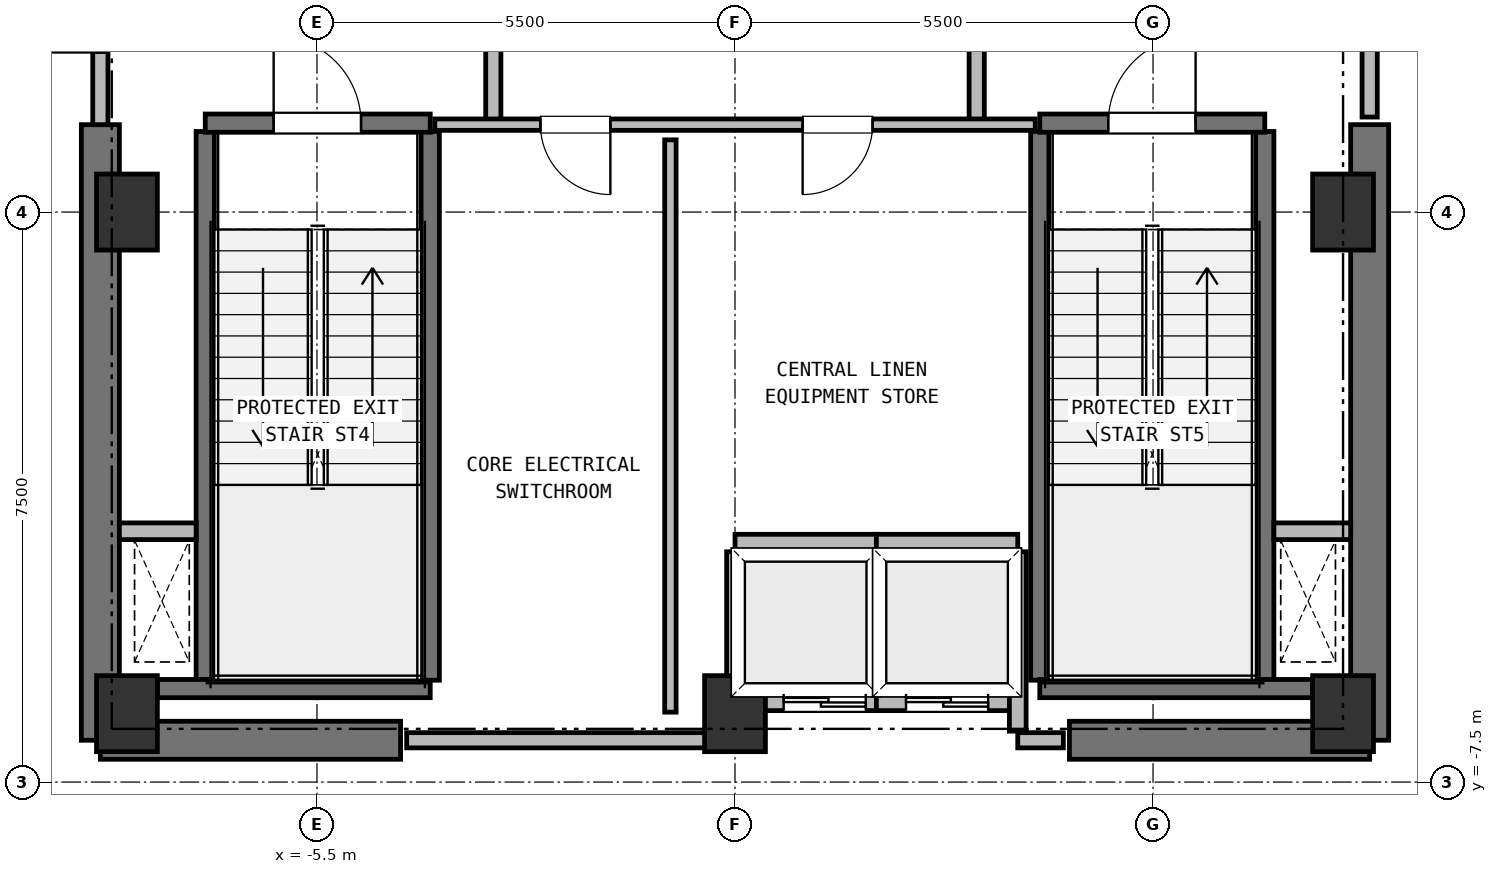
"""IFC4 building model, lengths in metres.
Left out: names, types, materials, properties, quantities, classifications, styles, units other than length and angle.
Written with IfcOpenShell. Run it as: python <this file> out.ifc"""

import sys

from ifc_helpers import new_model, si_unit, direction, frame, frame_2d, origin, origin_2d, place, context, subcontext, project, spatial, rectangle, extrude, element, fill, save


model = new_model("IFC4")
c1 = context("Model", 3, precision=1e-05, world=origin(), true_north=direction((0.0, 1.0)))
c2 = subcontext(c1, "Body", "Model", "MODEL_VIEW")
j1 = project(units=[si_unit("LENGTHUNIT", "METRE"), si_unit("PLANEANGLEUNIT", "RADIAN")], contexts=[c1])
p1 = place(None, origin())
s1 = spatial("IfcSite", under=j1, at=p1, CompositionType="ELEMENT")
p2 = place(p1, origin())
s2 = spatial("IfcBuilding", under=s1, at=p2, CompositionType="ELEMENT")
p3 = place(p2, frame((0.0, 0.0, 173.75)))
s3 = spatial("IfcBuildingStorey", under=s2, at=p3, CompositionType="ELEMENT", Elevation=173.75)
for number, where, z_axis, x_axis in (
    (1, (-8.0, -6.6, 0.0), (0.0, 0.0, 1.0), (1.0, 0.0, 0.0)),
    (2, (0.0, -6.6, 0.0), (0.0, 0.0, 1.0), (1.0, 0.0, 0.0)),
    (3, (8.0, -6.6, 0.0), (0.0, 0.0, 1.0), (1.0, 0.0, 0.0)),
    (4, (8.0, 0.0, 0.0), (0.0, 0.0, 1.0), (1.0, 0.0, 0.0)),
    (5, (-8.0, 0.0, 0.0), (0.0, 0.0, 1.0), (1.0, 0.0, 0.0)),
):
    element("IfcColumn", number, at=place(p3, frame(where, z_axis=z_axis, x_axis=x_axis)), inside=s3, PredefinedType="COLUMN", context=c2, shape_type="SweptSolid", body=[
        extrude(rectangle(XDim=0.8, YDim=1.0, at=origin_2d()), origin(), (0.0, 0.0, 1.0), 4.5),
    ])
for number, where, z_axis, x_axis in (
    (6, (-8.35, -6.95, 0.0), (0.0, 0.0, 1.0), (1.0, 0.0, 0.0)),
    (7, (4.4, -6.95, 0.0), (0.0, 0.0, 1.0), (1.0, 0.0, 0.0)),
):
    element("IfcWall", number, at=place(p3, frame(where, z_axis=z_axis, x_axis=x_axis)), inside=s3, PredefinedType="SHEAR", context=c2, shape_type="SweptSolid", body=[
        extrude(rectangle(XDim=3.95, YDim=0.5, at=frame_2d((1.975, 0.0))), origin(), (0.0, 0.0, 1.0), 4.21),
    ])
for number, where, z_axis, x_axis in (
    (8, (-8.35, -6.95, 0.0), (0.0, 0.0, 1.0), (0.0, 1.0, 0.0)),
    (9, (8.35, -6.95, 0.0), (0.0, 0.0, 1.0), (0.0, 1.0, 0.0)),
):
    element("IfcWall", number, at=place(p3, frame(where, z_axis=z_axis, x_axis=x_axis)), inside=s3, PredefinedType="SHEAR", context=c2, shape_type="SweptSolid", body=[
        extrude(rectangle(XDim=8.1, YDim=0.5, at=frame_2d((4.05, 0.0))), origin(), (0.0, 0.0, 1.0), 4.21),
    ])
p4 = place(p3, frame((13.125, -5.494, 0.0), z_axis=(0.0, 0.0, 1.0), x_axis=(-0.669139779012, -0.743136566281, 0.0)))
e10 = element("IfcWall", 10, at=p4, inside=s3, PredefinedType="SOLIDWALL", context=c2, shape_type="SweptSolid", body=[
    extrude(rectangle(XDim=9.4, YDim=0.36, at=frame_2d((4.7, 0.0))), origin(), (0.0, 0.0, 1.0), 3.89),
])
p5 = place(p4, frame((3.875, 0.0, 0.0)))
e11 = element("IfcOpeningElement", 11, at=p5, cuts=e10, PredefinedType="OPENING", context=c2, shape_type="SweptSolid", body=[
    extrude(rectangle(XDim=1.65, YDim=2.25, at=frame_2d((0.825, 1.125))), frame((0.0, 0.19, 0.0), z_axis=(0.0, -1.0, 0.0), x_axis=(1.0, 0.0, 0.0)), (0.0, 0.0, 1.0), 0.38),
])
p6 = place(p3, frame((-6.97, -6.16, 0.0), z_axis=(0.0, 0.0, 1.0), x_axis=(0.0, 1.0, 0.0)))
e12 = element("IfcWall", 12, at=p6, inside=s3, PredefinedType="SHEAR", context=c2, shape_type="SweptSolid", body=[
    extrude(rectangle(XDim=7.22, YDim=0.24, at=frame_2d((3.61, 0.0))), origin(), (0.0, 0.0, 1.0), 4.21),
])
p7 = place(p3, frame((-7.6, -6.27, 0.0), z_axis=(0.0, 0.0, 1.0), x_axis=(1.0, 0.0, 0.0)))
e13 = element("IfcWall", 13, at=p7, inside=s3, PredefinedType="SHEAR", context=c2, shape_type="SweptSolid", body=[
    extrude(rectangle(XDim=3.59, YDim=0.24, at=frame_2d((1.795, 0.0))), origin(), (0.0, 0.0, 1.0), 4.21),
])
p8 = place(p3, frame((-4.01, -6.16, 0.0), z_axis=(0.0, 0.0, 1.0), x_axis=(0.0, 1.0, 0.0)))
e14 = element("IfcWall", 14, at=p8, inside=s3, PredefinedType="SHEAR", context=c2, shape_type="SweptSolid", body=[
    extrude(rectangle(XDim=7.22, YDim=0.24, at=frame_2d((3.61, 0.0))), origin(), (0.0, 0.0, 1.0), 4.21),
])
p9 = place(p3, frame((-6.97, 1.17, 0.0), z_axis=(0.0, 0.0, 1.0), x_axis=(1.0, 0.0, 0.0)))
e15 = element("IfcWall", 15, at=p9, inside=s3, PredefinedType="SHEAR", context=c2, shape_type="SweptSolid", body=[
    extrude(rectangle(XDim=2.96, YDim=0.24, at=frame_2d((1.48, 0.0))), origin(), (0.0, 0.0, 1.0), 4.21),
])
p10 = place(p9, frame((0.9, 0.0, 0.0)))
e16 = element("IfcOpeningElement", 16, at=p10, cuts=e15, PredefinedType="OPENING", context=c2, shape_type="SweptSolid", body=[
    extrude(rectangle(XDim=1.15, YDim=2.15, at=frame_2d((0.575, 1.075))), frame((0.0, 0.13, 0.0), z_axis=(0.0, -1.0, 0.0), x_axis=(1.0, 0.0, 0.0)), (0.0, 0.0, 1.0), 0.26),
])
for number, where, z_axis, x_axis in (
    (17, (4.01, -6.16, 0.0), (0.0, 0.0, 1.0), (0.0, 1.0, 0.0)),
    (18, (6.97, -6.16, 0.0), (0.0, 0.0, 1.0), (0.0, 1.0, 0.0)),
):
    element("IfcWall", number, at=place(p3, frame(where, z_axis=z_axis, x_axis=x_axis)), inside=s3, PredefinedType="SHEAR", context=c2, shape_type="SweptSolid", body=[
        extrude(rectangle(XDim=7.22, YDim=0.24, at=frame_2d((3.61, 0.0))), origin(), (0.0, 0.0, 1.0), 4.21),
    ])
p11 = place(p3, frame((4.01, -6.27, 0.0), z_axis=(0.0, 0.0, 1.0), x_axis=(1.0, 0.0, 0.0)))
e19 = element("IfcWall", 19, at=p11, inside=s3, PredefinedType="SHEAR", context=c2, shape_type="SweptSolid", body=[
    extrude(rectangle(XDim=3.59, YDim=0.24, at=frame_2d((1.795, 0.0))), origin(), (0.0, 0.0, 1.0), 4.21),
])
p12 = place(p3, frame((4.01, 1.17, 0.0), z_axis=(0.0, 0.0, 1.0), x_axis=(1.0, 0.0, 0.0)))
e20 = element("IfcWall", 20, at=p12, inside=s3, PredefinedType="SHEAR", context=c2, shape_type="SweptSolid", body=[
    extrude(rectangle(XDim=2.96, YDim=0.24, at=frame_2d((1.48, 0.0))), origin(), (0.0, 0.0, 1.0), 4.21),
])
p13 = place(p12, frame((0.9, 0.0, 0.0)))
e21 = element("IfcOpeningElement", 21, at=p13, cuts=e20, PredefinedType="OPENING", context=c2, shape_type="SweptSolid", body=[
    extrude(rectangle(XDim=1.15, YDim=2.15, at=frame_2d((0.575, 1.075))), frame((0.0, 0.13, 0.0), z_axis=(0.0, -1.0, 0.0), x_axis=(1.0, 0.0, 0.0)), (0.0, 0.0, 1.0), 0.26),
])
for number, where, z_axis, x_axis in (
    (22, (-8.1, -4.2, 0.0), (0.0, 0.0, 1.0), (1.0, 0.0, 0.0)),
    (23, (7.09, -4.2, 0.0), (0.0, 0.0, 1.0), (1.0, 0.0, 0.0)),
):
    element("IfcWall", number, at=place(p3, frame(where, z_axis=z_axis, x_axis=x_axis)), inside=s3, PredefinedType="PARTITIONING", context=c2, shape_type="SweptSolid", body=[
        extrude(rectangle(XDim=1.01, YDim=0.22, at=frame_2d((0.505, 0.0))), origin(), (0.0, 0.0, 1.0), 4.21),
    ])
p14 = place(p3, frame((0.0, -6.45, 0.0), z_axis=(0.0, 0.0, 1.0), x_axis=(1.0, 0.0, 0.0)))
e24 = element("IfcWall", 24, at=p14, inside=s3, PredefinedType="PARTITIONING", context=c2, shape_type="SweptSolid", body=[
    extrude(rectangle(XDim=1.86, YDim=0.22, at=frame_2d((0.93, 0.0))), origin(), (0.0, 0.0, 1.0), 3.84),
])
p15 = place(p14, frame((0.64, 0.0, 0.0)))
e25 = element("IfcOpeningElement", 25, at=p15, cuts=e24, PredefinedType="OPENING", context=c2, shape_type="SweptSolid", body=[
    extrude(rectangle(XDim=1.08, YDim=2.15, at=frame_2d((0.54, 1.075))), frame((0.0, 0.12, 0.0), z_axis=(0.0, -1.0, 0.0), x_axis=(1.0, 0.0, 0.0)), (0.0, 0.0, 1.0), 0.24),
])
for number, where, z_axis, x_axis in (
    (26, (0.0, -4.35, 0.0), (0.0, 0.0, 1.0), (1.0, 0.0, 0.0)),
    (27, (0.0, -6.33, 0.0), (0.0, 0.0, 1.0), (0.0, 1.0, 0.0)),
    (28, (1.86, -6.33, 0.0), (0.0, 0.0, 1.0), (0.0, 1.0, 0.0)),
):
    element("IfcWall", number, at=place(p3, frame(where, z_axis=z_axis, x_axis=x_axis)), inside=s3, PredefinedType="PARTITIONING", context=c2, shape_type="SweptSolid", body=[
        extrude(rectangle(XDim=1.86, YDim=0.22, at=frame_2d((0.93, 0.0))), origin(), (0.0, 0.0, 1.0), 4.21),
    ])
p16 = place(p3, frame((1.86, -6.45, 0.0), z_axis=(0.0, 0.0, 1.0), x_axis=(1.0, 0.0, 0.0)))
e29 = element("IfcWall", 29, at=p16, inside=s3, PredefinedType="PARTITIONING", context=c2, shape_type="SweptSolid", body=[
    extrude(rectangle(XDim=1.86, YDim=0.22, at=frame_2d((0.93, 0.0))), origin(), (0.0, 0.0, 1.0), 3.84),
])
p17 = place(p16, frame((0.39, 0.0, 0.0)))
e30 = element("IfcOpeningElement", 30, at=p17, cuts=e29, PredefinedType="OPENING", context=c2, shape_type="SweptSolid", body=[
    extrude(rectangle(XDim=1.08, YDim=2.15, at=frame_2d((0.54, 1.075))), frame((0.0, 0.12, 0.0), z_axis=(0.0, -1.0, 0.0), x_axis=(1.0, 0.0, 0.0)), (0.0, 0.0, 1.0), 0.24),
])
p18 = place(p3, frame((1.86, -4.35, 0.0), z_axis=(0.0, 0.0, 1.0), x_axis=(1.0, 0.0, 0.0)))
e31 = element("IfcWall", 31, at=p18, inside=s3, PredefinedType="PARTITIONING", context=c2, shape_type="SweptSolid", body=[
    extrude(rectangle(XDim=1.86, YDim=0.22, at=frame_2d((0.93, 0.0))), origin(), (0.0, 0.0, 1.0), 4.21),
])
p19 = place(p3, frame((3.72, -6.83, 0.0), z_axis=(0.0, 0.0, 1.0), x_axis=(0.0, 1.0, 0.0)))
e32 = element("IfcWall", 32, at=p19, inside=s3, PredefinedType="PARTITIONING", context=c2, shape_type="SweptSolid", body=[
    extrude(rectangle(XDim=2.36, YDim=0.22, at=frame_2d((1.18, 0.0))), origin(), (0.0, 0.0, 1.0), 4.21),
])
p20 = place(p3, frame((-3.18, 1.15, 0.0), z_axis=(0.0, 0.0, 1.0), x_axis=(0.0, 1.0, 0.0)))
e33 = element("IfcWall", 33, at=p20, inside=s3, PredefinedType="PARTITIONING", context=c2, shape_type="SweptSolid", body=[
    extrude(rectangle(XDim=3.3, YDim=0.2, at=frame_2d((1.65, 0.0))), origin(), (0.0, 0.0, 1.0), 4.21),
])
p21 = place(p20, frame((1.08, 0.0, 0.0)))
e34 = element("IfcOpeningElement", 34, at=p21, cuts=e33, PredefinedType="OPENING", context=c2, shape_type="SweptSolid", body=[
    extrude(rectangle(XDim=1.15, YDim=2.15, at=frame_2d((0.575, 1.075))), frame((0.0, 0.11, 0.0), z_axis=(0.0, -1.0, 0.0), x_axis=(1.0, 0.0, 0.0)), (0.0, 0.0, 1.0), 0.22),
])
p22 = place(p3, frame((3.18, 1.15, 0.0), z_axis=(0.0, 0.0, 1.0), x_axis=(0.0, 1.0, 0.0)))
e35 = element("IfcWall", 35, at=p22, inside=s3, PredefinedType="PARTITIONING", context=c2, shape_type="SweptSolid", body=[
    extrude(rectangle(XDim=3.3, YDim=0.2, at=frame_2d((1.65, 0.0))), origin(), (0.0, 0.0, 1.0), 4.21),
])
p23 = place(p22, frame((1.08, 0.0, 0.0)))
e36 = element("IfcOpeningElement", 36, at=p23, cuts=e35, PredefinedType="OPENING", context=c2, shape_type="SweptSolid", body=[
    extrude(rectangle(XDim=1.15, YDim=2.15, at=frame_2d((0.575, 1.075))), frame((0.0, 0.11, 0.0), z_axis=(0.0, -1.0, 0.0), x_axis=(1.0, 0.0, 0.0)), (0.0, 0.0, 1.0), 0.22),
])
p24 = place(p3, frame((-8.35, 1.15, 0.0), z_axis=(0.0, 0.0, 1.0), x_axis=(0.0, 1.0, 0.0)))
e37 = element("IfcWall", 37, at=p24, inside=s3, PredefinedType="PARTITIONING", context=c2, shape_type="SweptSolid", body=[
    extrude(rectangle(XDim=5.4, YDim=0.2, at=frame_2d((2.7, 0.0))), origin(), (0.0, 0.0, 1.0), 4.21),
])
p25 = place(p24, frame((0.95, 0.0, 0.0)))
e38 = element("IfcOpeningElement", 38, at=p25, cuts=e37, PredefinedType="OPENING", context=c2, shape_type="SweptSolid", body=[
    extrude(rectangle(XDim=1.15, YDim=2.15, at=frame_2d((0.575, 1.075))), frame((0.0, 0.11, 0.0), z_axis=(0.0, -1.0, 0.0), x_axis=(1.0, 0.0, 0.0)), (0.0, 0.0, 1.0), 0.22),
])
p26 = place(p3, frame((8.35, 1.25, 0.0), z_axis=(0.0, 0.0, 1.0), x_axis=(0.0, 1.0, 0.0)))
e39 = element("IfcWall", 39, at=p26, inside=s3, PredefinedType="PARTITIONING", context=c2, shape_type="SweptSolid", body=[
    extrude(rectangle(XDim=5.3, YDim=0.2, at=frame_2d((2.65, 0.0))), origin(), (0.0, 0.0, 1.0), 4.21),
])
p27 = place(p26, frame((0.95, 0.0, 0.0)))
e40 = element("IfcOpeningElement", 40, at=p27, cuts=e39, PredefinedType="OPENING", context=c2, shape_type="SweptSolid", body=[
    extrude(rectangle(XDim=1.15, YDim=2.15, at=frame_2d((0.575, 1.075))), frame((0.0, 0.11, 0.0), z_axis=(0.0, -1.0, 0.0), x_axis=(1.0, 0.0, 0.0)), (0.0, 0.0, 1.0), 0.22),
])
p28 = place(p3, frame((3.95, 1.15, 0.0), z_axis=(0.0, 0.0, 1.0), x_axis=(-1.0, 0.0, 0.0)))
e41 = element("IfcWall", 41, at=p28, inside=s3, PredefinedType="PARTITIONING", context=c2, shape_type="SweptSolid", body=[
    extrude(rectangle(XDim=7.9, YDim=0.15, at=frame_2d((3.95, 0.0))), origin(), (0.0, 0.0, 1.0), 4.21),
])
p29 = place(p28, frame((5.59, 0.0, 0.0)))
e42 = element("IfcOpeningElement", 42, at=p29, cuts=e41, PredefinedType="OPENING", context=c2, shape_type="SweptSolid", body=[
    extrude(rectangle(XDim=0.92, YDim=2.05, at=frame_2d((0.46, 1.025))), frame((0.0, 0.085, 0.0), z_axis=(0.0, -1.0, 0.0), x_axis=(1.0, 0.0, 0.0)), (0.0, 0.0, 1.0), 0.17),
])
p30 = place(p28, frame((2.14, 0.0, 0.0)))
e43 = element("IfcOpeningElement", 43, at=p30, cuts=e41, PredefinedType="OPENING", context=c2, shape_type="SweptSolid", body=[
    extrude(rectangle(XDim=0.92, YDim=2.05, at=frame_2d((0.46, 1.025))), frame((0.0, 0.085, 0.0), z_axis=(0.0, -1.0, 0.0), x_axis=(1.0, 0.0, 0.0)), (0.0, 0.0, 1.0), 0.17),
])
p31 = place(p3, frame((-4.32, -6.95, 0.0), z_axis=(0.0, 0.0, 1.0), x_axis=(1.0, 0.0, 0.0)))
e44 = element("IfcWall", 44, at=p31, inside=s3, PredefinedType="PARTITIONING", context=c2, shape_type="SweptSolid", body=[
    extrude(rectangle(XDim=4.32, YDim=0.2, at=frame_2d((2.16, 0.0))), origin(), (0.0, 0.0, 1.0), 4.21),
])
p32 = place(p3, frame((3.72, -6.95, 0.0), z_axis=(0.0, 0.0, 1.0), x_axis=(1.0, 0.0, 0.0)))
e45 = element("IfcWall", 45, at=p32, inside=s3, PredefinedType="PARTITIONING", context=c2, shape_type="SweptSolid", body=[
    extrude(rectangle(XDim=0.6, YDim=0.2, at=frame_2d((0.3, 0.0))), origin(), (0.0, 0.0, 1.0), 4.21),
])
p33 = place(p3, frame((-0.85, -6.58, 0.0), z_axis=(0.0, 0.0, 1.0), x_axis=(0.0, 1.0, 0.0)))
e46 = element("IfcWall", 46, at=p33, inside=s3, PredefinedType="PARTITIONING", context=c2, shape_type="SweptSolid", body=[
    extrude(rectangle(XDim=7.53, YDim=0.15, at=frame_2d((3.765, 0.0))), origin(), (0.0, 0.0, 1.0), 4.21),
])
for number, where, z_axis, x_axis in (
    (47, (10.422, -7.309, 0.0), (0.0, 0.0, 1.0), (-0.694, -0.72, 0.0)),
    (48, (-8.648, -9.151, 0.0), (0.0, 0.0, 1.0), (-0.694, 0.72, 0.0)),
):
    element("IfcWall", number, at=place(p3, frame(where, z_axis=z_axis, x_axis=x_axis)), inside=s3, PredefinedType="PARTITIONING", context=c2, shape_type="SweptSolid", body=[
        extrude(rectangle(XDim=2.558, YDim=0.15, at=frame_2d((1.279, 0.0))), origin(), (0.0, 0.0, 1.0), 3.89),
    ])
p34 = place(p10, origin())
e49 = element("IfcDoor", 49, at=p34, inside=s3, OperationType="SINGLE_SWING_LEFT", PredefinedType="DOOR", context=c2, shape_type="SweptSolid", body=[
    extrude(rectangle(XDim=1.15, YDim=2.15, at=frame_2d((0.575, 1.075))), frame((0.0, 0.025, 0.0), z_axis=(0.0, -1.0, 0.0), x_axis=(1.0, 0.0, 0.0)), (0.0, 0.0, 1.0), 0.05),
])
fill(e16, e49)
p35 = place(p13, origin())
e50 = element("IfcDoor", 50, at=p35, inside=s3, OperationType="SINGLE_SWING_RIGHT", PredefinedType="DOOR", context=c2, shape_type="SweptSolid", body=[
    extrude(rectangle(XDim=1.15, YDim=2.15, at=frame_2d((0.575, 1.075))), frame((0.0, 0.025, 0.0), z_axis=(0.0, -1.0, 0.0), x_axis=(1.0, 0.0, 0.0)), (0.0, 0.0, 1.0), 0.05),
])
fill(e21, e50)
p36 = place(p15, origin())
e51 = element("IfcDoor", 51, at=p36, inside=s3, OperationType="DOUBLE_DOOR_SLIDING", PredefinedType="DOOR", context=c2, shape_type="SweptSolid", body=[
    extrude(rectangle(XDim=1.08, YDim=2.15, at=frame_2d((0.54, 1.075))), frame((0.0, 0.025, 0.0), z_axis=(0.0, -1.0, 0.0), x_axis=(1.0, 0.0, 0.0)), (0.0, 0.0, 1.0), 0.05),
])
fill(e25, e51)
p37 = place(p17, origin())
e52 = element("IfcDoor", 52, at=p37, inside=s3, OperationType="DOUBLE_DOOR_SLIDING", PredefinedType="DOOR", context=c2, shape_type="SweptSolid", body=[
    extrude(rectangle(XDim=1.08, YDim=2.15, at=frame_2d((0.54, 1.075))), frame((0.0, 0.025, 0.0), z_axis=(0.0, -1.0, 0.0), x_axis=(1.0, 0.0, 0.0)), (0.0, 0.0, 1.0), 0.05),
])
fill(e30, e52)
p38 = place(p25, origin())
e53 = element("IfcDoor", 53, at=p38, inside=s3, OperationType="SINGLE_SWING_LEFT", PredefinedType="DOOR", context=c2, shape_type="SweptSolid", body=[
    extrude(rectangle(XDim=1.15, YDim=2.15, at=frame_2d((0.575, 1.075))), frame((0.0, 0.025, 0.0), z_axis=(0.0, -1.0, 0.0), x_axis=(1.0, 0.0, 0.0)), (0.0, 0.0, 1.0), 0.05),
])
fill(e38, e53)
p39 = place(p29, origin())
e54 = element("IfcDoor", 54, at=p39, inside=s3, OperationType="SINGLE_SWING_LEFT", PredefinedType="DOOR", context=c2, shape_type="SweptSolid", body=[
    extrude(rectangle(XDim=0.92, YDim=2.05, at=frame_2d((0.46, 1.025))), frame((0.0, 0.025, 0.0), z_axis=(0.0, -1.0, 0.0), x_axis=(1.0, 0.0, 0.0)), (0.0, 0.0, 1.0), 0.05),
])
fill(e42, e54)
p40 = place(p30, origin())
e55 = element("IfcDoor", 55, at=p40, inside=s3, OperationType="SINGLE_SWING_RIGHT", PredefinedType="DOOR", context=c2, shape_type="SweptSolid", body=[
    extrude(rectangle(XDim=0.92, YDim=2.05, at=frame_2d((0.46, 1.025))), frame((0.0, 0.025, 0.0), z_axis=(0.0, -1.0, 0.0), x_axis=(1.0, 0.0, 0.0)), (0.0, 0.0, 1.0), 0.05),
])
fill(e43, e55)
save(model, sys.argv[1])
